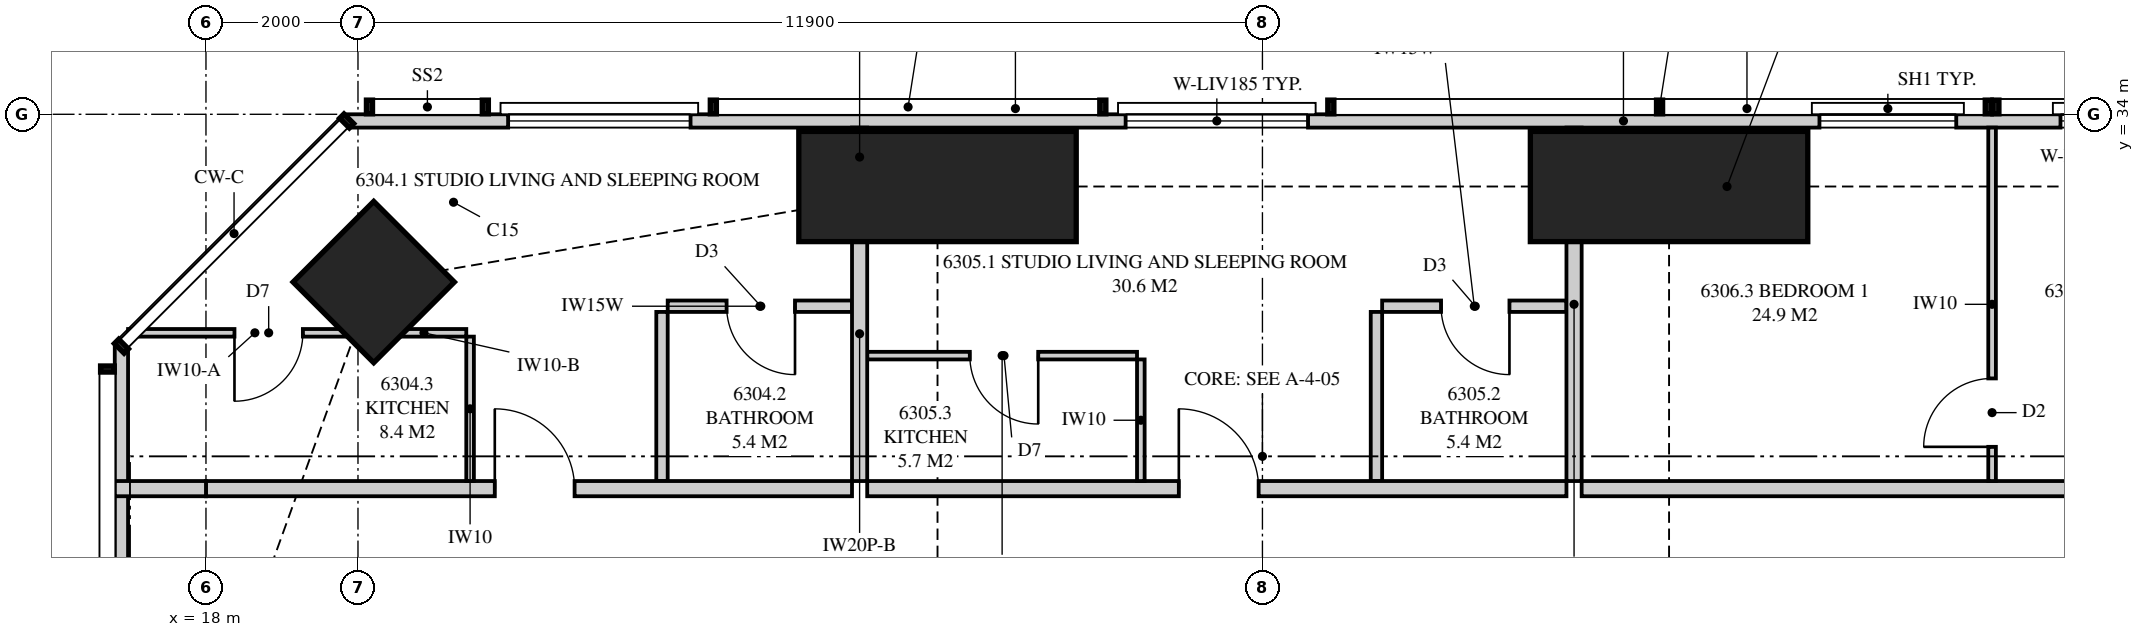
"""IFC4 building model, lengths in metres.
Left out: names, types, materials, properties, quantities, classifications, styles, units other than length and angle.
Written with IfcOpenShell. Run it as: python <this file> out.ifc"""

import sys

from ifc_helpers import new_model, si_unit, direction, frame, frame_2d, origin, origin_2d, place, context, subcontext, project, spatial, polyline, rectangle, outline, extrude, element, fill, save


model = new_model("IFC4")
c1 = context("Model", 3, precision=1e-05, world=origin(), true_north=direction((0.0, 1.0)))
c2 = subcontext(c1, "Body", "Model", "MODEL_VIEW")
j1 = project(units=[si_unit("LENGTHUNIT", "METRE"), si_unit("PLANEANGLEUNIT", "RADIAN")], contexts=[c1])
p1 = place(None, origin())
s1 = spatial("IfcSite", under=j1, at=p1, CompositionType="ELEMENT")
p2 = place(p1, origin())
s2 = spatial("IfcBuilding", under=s1, at=p2, CompositionType="ELEMENT")
p3 = place(p2, frame((0.0, 0.0, 231.95)))
s3 = spatial("IfcBuildingStorey", under=s2, at=p3, CompositionType="ELEMENT", Elevation=231.95)
for number, where, z_axis, x_axis in (
    (1, (37.25, 33.05, 0.0), (0.0, 0.0, 1.0), (0.0, 1.0, 0.0)),
    (2, (27.625, 33.05, 0.0), (0.0, 0.0, 1.0), (0.0, 1.0, 0.0)),
):
    element("IfcColumn", number, at=place(p3, frame(where, z_axis=z_axis, x_axis=x_axis)), inside=s3, PredefinedType="COLUMN", context=c2, shape_type="SweptSolid", body=[
        extrude(rectangle(XDim=1.45, YDim=3.65, at=origin_2d()), origin(), (0.0, 0.0, 1.0), 3.5),
    ])
p4 = place(p3, frame((20.207, 31.793, 0.0), z_axis=(0.0, 0.0, 1.0), x_axis=(0.707106781187, 0.707106781187, 0.0)))
e3 = element("IfcColumn", 3, at=p4, inside=s3, PredefinedType="COLUMN", context=c2, shape_type="SweptSolid", body=[
    extrude(rectangle(XDim=1.5, YDim=1.5, at=origin_2d()), origin(), (0.0, 0.0, 1.0), 3.5),
])
p5 = place(p3, frame((53.449, 33.913, 0.0), z_axis=(0.0, 0.0, 1.0), x_axis=(-1.0, 0.0, 0.0)))
e4 = element("IfcWall", 4, at=p5, inside=s3, PredefinedType="SOLIDWALL", context=c2, shape_type="SweptSolid", body=[
    extrude(outline(polyline([(0.0, 0.0), (33.597, 0.0), (33.597, 3.26), (26.039, 3.26), (26.039, 2.3), (25.955, 2.3), (25.955, 3.26), (25.824, 3.26), (25.824, 2.3), (6.574, 2.3), (6.574, 3.26), (6.442, 3.26), (6.442, 2.3), (6.359, 2.3), (6.359, 3.26), (0.0, 3.26), (0.0, 0.0)])), frame((0.0, 0.087, 0.0), z_axis=(0.0, -1.0, 0.0), x_axis=(1.0, 0.0, 0.0)), (0.0, 0.0, 1.0), 0.175),
])
p6 = place(p5, frame((0.6, 0.0, 0.0)))
e5 = element("IfcOpeningElement", 5, at=p6, cuts=e4, PredefinedType="OPENING", context=c2, shape_type="SweptSolid", body=[
    extrude(rectangle(XDim=1.8, YDim=2.25, at=frame_2d((0.9, 1.125))), frame((0.0, 0.097, 0.0), z_axis=(0.0, -1.0, 0.0), x_axis=(1.0, 0.0, 0.0)), (0.0, 0.0, 1.0), 0.195),
])
p7 = place(p5, frame((2.835, 0.0, 0.4)))
e6 = element("IfcOpeningElement", 6, at=p7, cuts=e4, PredefinedType="OPENING", context=c2, shape_type="SweptSolid", body=[
    extrude(rectangle(XDim=1.8, YDim=1.85, at=frame_2d((0.9, 0.925))), frame((0.0, 0.097, 0.0), z_axis=(0.0, -1.0, 0.0), x_axis=(1.0, 0.0, 0.0)), (0.0, 0.0, 1.0), 0.195),
])
p8 = place(p5, frame((9.249, 0.0, 0.4)))
e7 = element("IfcOpeningElement", 7, at=p8, cuts=e4, PredefinedType="OPENING", context=c2, shape_type="SweptSolid", body=[
    extrude(rectangle(XDim=1.8, YDim=1.85, at=frame_2d((0.9, 0.925))), frame((0.0, 0.097, 0.0), z_axis=(0.0, -1.0, 0.0), x_axis=(1.0, 0.0, 0.0)), (0.0, 0.0, 1.0), 0.195),
])
p9 = place(p5, frame((12.42, 0.0, 0.4)))
e8 = element("IfcOpeningElement", 8, at=p9, cuts=e4, PredefinedType="OPENING", context=c2, shape_type="SweptSolid", body=[
    extrude(rectangle(XDim=1.8, YDim=1.85, at=frame_2d((0.9, 0.925))), frame((0.0, 0.097, 0.0), z_axis=(0.0, -1.0, 0.0), x_axis=(1.0, 0.0, 0.0)), (0.0, 0.0, 1.0), 0.195),
])
p10 = place(p5, frame((20.949, 0.0, 0.4)))
e9 = element("IfcOpeningElement", 9, at=p10, cuts=e4, PredefinedType="OPENING", context=c2, shape_type="SweptSolid", body=[
    extrude(rectangle(XDim=2.4, YDim=1.85, at=frame_2d((1.2, 0.925))), frame((0.0, 0.097, 0.0), z_axis=(0.0, -1.0, 0.0), x_axis=(1.0, 0.0, 0.0)), (0.0, 0.0, 1.0), 0.195),
])
p11 = place(p5, frame((29.073, 0.0, 0.4)))
e10 = element("IfcOpeningElement", 10, at=p11, cuts=e4, PredefinedType="OPENING", context=c2, shape_type="SweptSolid", body=[
    extrude(rectangle(XDim=2.4, YDim=1.85, at=frame_2d((1.2, 0.925))), frame((0.0, 0.097, 0.0), z_axis=(0.0, -1.0, 0.0), x_axis=(1.0, 0.0, 0.0)), (0.0, 0.0, 1.0), 0.195),
])
p12 = place(p3, frame((16.887, 30.949, 0.0), z_axis=(0.0, 0.0, 1.0), x_axis=(0.0, -1.0, 0.0)))
e11 = element("IfcWall", 11, at=p12, inside=s3, PredefinedType="SOLIDWALL", context=c2, shape_type="SweptSolid", body=[
    extrude(outline(polyline([(0.0, 0.0), (27.897, 0.0), (27.897, 3.26), (18.148, 3.26), (18.148, 2.3), (18.125, 2.3), (18.125, 3.26), (17.949, 3.26), (17.949, 2.3), (5.949, 2.3), (5.949, 3.26), (0.0, 3.26), (0.0, 0.0)])), frame((0.0, 0.087, 0.0), z_axis=(0.0, -1.0, 0.0), x_axis=(1.0, 0.0, 0.0)), (0.0, 0.0, 1.0), 0.175),
])
p13 = place(p12, frame((11.849, 0.0, 0.4)))
e12 = element("IfcOpeningElement", 12, at=p13, cuts=e11, PredefinedType="OPENING", context=c2, shape_type="SweptSolid", body=[
    extrude(rectangle(XDim=1.2, YDim=1.85, at=frame_2d((0.6, 0.925))), frame((0.0, 0.097, 0.0), z_axis=(0.0, -1.0, 0.0), x_axis=(1.0, 0.0, 0.0)), (0.0, 0.0, 1.0), 0.195),
])
p14 = place(p3, frame((26.6, 33.825, 0.0), z_axis=(0.0, 0.0, 1.0), x_axis=(0.0, -1.0, 0.0)))
e13 = element("IfcWall", 13, at=p14, inside=s3, PredefinedType="PARTITIONING", context=c2, shape_type="SweptSolid", body=[
    extrude(outline(polyline([(0.026, 2.3), (0.026, 3.26), (0.0, 3.26), (0.0, 0.0), (0.529, 0.0), (0.529, 0.539), (0.775, 0.539), (0.775, 1.761), (0.529, 1.761), (0.529, 2.3), (0.026, 2.3)])), frame((0.0, 0.1, 0.0), z_axis=(0.0, -1.0, 0.0), x_axis=(1.0, 0.0, 0.0)), (0.0, 0.0, 1.0), 0.2),
])
p15 = place(p3, frame((26.6, 33.05, 0.0), z_axis=(0.0, 0.0, 1.0), x_axis=(0.0, -1.0, 0.0)))
e14 = element("IfcWall", 14, at=p15, inside=s3, PredefinedType="PARTITIONING", context=c2, shape_type="SweptSolid", body=[
    extrude(outline(polyline([(0.246, 2.3), (0.246, 1.761), (0.0, 1.761), (0.0, 0.539), (0.246, 0.539), (0.246, 0.0), (3.875, 0.0), (3.875, 2.66), (1.097, 2.66), (1.097, 2.3), (0.246, 2.3)])), frame((0.0, 0.1, 0.0), z_axis=(0.0, -1.0, 0.0), x_axis=(1.0, 0.0, 0.0)), (0.0, 0.0, 1.0), 0.2),
])
p16 = place(p3, frame((18.0, 29.075, 0.0), z_axis=(0.0, 0.0, 1.0), x_axis=(1.0, 0.0, 0.0)))
e15 = element("IfcWall", 15, at=p16, inside=s3, PredefinedType="PARTITIONING", context=c2, shape_type="SweptSolid", body=[
    extrude(outline(polyline([(0.0, 0.0), (8.5, 0.0), (8.5, 3.26), (8.5, 2.66), (8.315, 2.66), (8.315, 3.26), (2.192, 3.26), (2.192, 2.3), (0.256, 2.3), (0.256, 3.26), (0.0, 3.26), (0.0, 0.0)])), frame((0.0, 0.1, 0.0), z_axis=(0.0, -1.0, 0.0), x_axis=(1.0, 0.0, 0.0)), (0.0, 0.0, 1.0), 0.2),
])
p17 = place(p16, frame((3.8, 0.0, 0.0)))
e16 = element("IfcOpeningElement", 16, at=p17, cuts=e15, PredefinedType="OPENING", context=c2, shape_type="SweptSolid", body=[
    extrude(rectangle(XDim=1.05, YDim=2.2, at=frame_2d((0.525, 1.1))), frame((0.0, 0.11, 0.0), z_axis=(0.0, -1.0, 0.0), x_axis=(1.0, 0.0, 0.0)), (0.0, 0.0, 1.0), 0.22),
])
p18 = place(p3, frame((24.075, 31.475, 0.0), z_axis=(0.0, 0.0, 1.0), x_axis=(1.0, 0.0, 0.0)))
e17 = element("IfcWall", 17, at=p18, inside=s3, PredefinedType="PLUMBINGWALL", context=c2, shape_type="SweptSolid", body=[
    extrude(outline(polyline([(0.0, 0.0), (2.425, 0.0), (2.425, 3.26), (2.425, 2.66), (2.265, 2.66), (2.265, 3.26), (0.0, 3.26), (0.0, 0.0)])), frame((0.0, 0.075, 0.0), z_axis=(0.0, -1.0, 0.0), x_axis=(1.0, 0.0, 0.0)), (0.0, 0.0, 1.0), 0.15),
])
p19 = place(p18, frame((0.775, 0.0, 0.0)))
e18 = element("IfcOpeningElement", 18, at=p19, cuts=e17, PredefinedType="OPENING", context=c2, shape_type="SweptSolid", body=[
    extrude(rectangle(XDim=0.9, YDim=2.1, at=frame_2d((0.45, 1.05))), frame((0.0, 0.085, 0.0), z_axis=(0.0, -1.0, 0.0), x_axis=(1.0, 0.0, 0.0)), (0.0, 0.0, 1.0), 0.17),
])
p20 = place(p3, frame((24.0, 31.4, 0.0), z_axis=(0.0, 0.0, 1.0), x_axis=(0.0, -1.0, 0.0)))
e19 = element("IfcWall", 19, at=p20, inside=s3, PredefinedType="PLUMBINGWALL", context=c2, shape_type="SweptSolid", body=[
    extrude(rectangle(XDim=2.225, YDim=0.15, at=frame_2d((1.112, 0.0))), origin(), (0.0, 0.0, 1.0), 3.26),
])
p21 = place(p3, frame((16.975, 31.125, 0.0), z_axis=(0.0, 0.0, 1.0), x_axis=(1.0, 0.0, 0.0)))
e20 = element("IfcWall", 20, at=p21, inside=s3, PredefinedType="PARTITIONING", context=c2, shape_type="SweptSolid", body=[
    extrude(outline(polyline([(0.0, 0.0), (3.337, 0.0), (3.337, 2.3), (2.076, 2.3), (2.076, 3.26), (0.0, 3.26), (0.0, 0.0)])), frame((0.0, 0.05, 0.0), z_axis=(0.0, -1.0, 0.0), x_axis=(1.0, 0.0, 0.0)), (0.0, 0.0, 1.0), 0.1),
])
p22 = place(p21, frame((1.4, 0.0, 0.0)))
e21 = element("IfcOpeningElement", 21, at=p22, cuts=e20, PredefinedType="OPENING", context=c2, shape_type="SweptSolid", body=[
    extrude(rectangle(XDim=0.9, YDim=2.1, at=frame_2d((0.45, 1.05))), frame((0.0, 0.06, 0.0), z_axis=(0.0, -1.0, 0.0), x_axis=(1.0, 0.0, 0.0)), (0.0, 0.0, 1.0), 0.12),
])
p23 = place(p3, frame((20.312, 31.125, 0.0), z_axis=(0.0, 0.0, 1.0), x_axis=(1.0, 0.0, 0.0)))
e22 = element("IfcWall", 22, at=p23, inside=s3, PredefinedType="PARTITIONING", context=c2, shape_type="SweptSolid", body=[
    extrude(rectangle(XDim=1.113, YDim=0.1, at=frame_2d((0.557, 0.0))), origin(), (0.0, 0.0, 1.0), 2.3),
])
p24 = place(p3, frame((21.475, 31.075, 0.0), z_axis=(0.0, 0.0, 1.0), x_axis=(0.0, -1.0, 0.0)))
e23 = element("IfcWall", 23, at=p24, inside=s3, PredefinedType="PARTITIONING", context=c2, shape_type="SweptSolid", body=[
    extrude(rectangle(XDim=1.9, YDim=0.1, at=frame_2d((0.95, 0.0))), origin(), (0.0, 0.0, 1.0), 3.26),
])
p25 = place(p3, frame((36.0, 33.825, 0.0), z_axis=(0.0, 0.0, 1.0), x_axis=(0.0, -1.0, 0.0)))
e24 = element("IfcWall", 24, at=p25, inside=s3, PredefinedType="PARTITIONING", context=c2, shape_type="SweptSolid", body=[
    extrude(outline(polyline([(0.529, 2.3), (0.0, 2.3), (0.0, 0.0), (0.529, 0.0), (0.529, 0.281), (1.021, 0.281), (1.021, 0.0), (4.65, 0.0), (4.65, 2.66), (1.685, 2.66), (1.685, 2.3), (1.021, 2.3), (1.021, 2.019), (0.529, 2.019), (0.529, 2.3)])), frame((0.0, 0.1, 0.0), z_axis=(0.0, -1.0, 0.0), x_axis=(1.0, 0.0, 0.0)), (0.0, 0.0, 1.0), 0.2),
])
p26 = place(p3, frame((26.7, 29.075, 0.0), z_axis=(0.0, 0.0, 1.0), x_axis=(1.0, 0.0, 0.0)))
e25 = element("IfcWall", 25, at=p26, inside=s3, PredefinedType="PARTITIONING", context=c2, shape_type="SweptSolid", body=[
    extrude(outline(polyline([(0.0, 0.0), (9.2, 0.0), (9.2, 3.26), (2.235, 3.26), (2.235, 2.66), (0.0, 2.66), (0.0, 3.26), (0.0, 0.0)])), frame((0.0, 0.1, 0.0), z_axis=(0.0, -1.0, 0.0), x_axis=(1.0, 0.0, 0.0)), (0.0, 0.0, 1.0), 0.2),
])
p27 = place(p26, frame((4.1, 0.0, 0.0)))
e26 = element("IfcOpeningElement", 26, at=p27, cuts=e25, PredefinedType="OPENING", context=c2, shape_type="SweptSolid", body=[
    extrude(rectangle(XDim=1.05, YDim=2.2, at=frame_2d((0.525, 1.1))), frame((0.0, 0.11, 0.0), z_axis=(0.0, -1.0, 0.0), x_axis=(1.0, 0.0, 0.0)), (0.0, 0.0, 1.0), 0.22),
])
p28 = place(p3, frame((33.475, 31.475, 0.0), z_axis=(0.0, 0.0, 1.0), x_axis=(1.0, 0.0, 0.0)))
e27 = element("IfcWall", 27, at=p28, inside=s3, PredefinedType="PLUMBINGWALL", context=c2, shape_type="SweptSolid", body=[
    extrude(rectangle(XDim=2.425, YDim=0.15, at=frame_2d((1.212, 0.0))), origin(), (0.0, 0.0, 1.0), 3.26),
])
p29 = place(p28, frame((0.775, 0.0, 0.0)))
e28 = element("IfcOpeningElement", 28, at=p29, cuts=e27, PredefinedType="OPENING", context=c2, shape_type="SweptSolid", body=[
    extrude(rectangle(XDim=0.9, YDim=2.1, at=frame_2d((0.45, 1.05))), frame((0.0, 0.085, 0.0), z_axis=(0.0, -1.0, 0.0), x_axis=(1.0, 0.0, 0.0)), (0.0, 0.0, 1.0), 0.17),
])
p30 = place(p3, frame((33.4, 31.4, 0.0), z_axis=(0.0, 0.0, 1.0), x_axis=(0.0, -1.0, 0.0)))
e29 = element("IfcWall", 29, at=p30, inside=s3, PredefinedType="PLUMBINGWALL", context=c2, shape_type="SweptSolid", body=[
    extrude(rectangle(XDim=2.225, YDim=0.15, at=frame_2d((1.112, 0.0))), origin(), (0.0, 0.0, 1.0), 3.26),
])
p31 = place(p3, frame((26.7, 30.825, 0.0), z_axis=(0.0, 0.0, 1.0), x_axis=(1.0, 0.0, 0.0)))
e30 = element("IfcWall", 30, at=p31, inside=s3, PredefinedType="PARTITIONING", context=c2, shape_type="SweptSolid", body=[
    extrude(outline(polyline([(0.0, 0.0), (3.55, 0.0), (3.55, 3.26), (2.185, 3.26), (2.185, 2.66), (0.0, 2.66), (0.0, 3.26), (0.0, 0.0)])), frame((0.0, 0.05, 0.0), z_axis=(0.0, -1.0, 0.0), x_axis=(1.0, 0.0, 0.0)), (0.0, 0.0, 1.0), 0.1),
])
p32 = place(p31, frame((1.35, 0.0, 0.0)))
e31 = element("IfcOpeningElement", 31, at=p32, cuts=e30, PredefinedType="OPENING", context=c2, shape_type="SweptSolid", body=[
    extrude(rectangle(XDim=0.9, YDim=2.1, at=frame_2d((0.45, 1.05))), frame((0.0, 0.06, 0.0), z_axis=(0.0, -1.0, 0.0), x_axis=(1.0, 0.0, 0.0)), (0.0, 0.0, 1.0), 0.12),
])
p33 = place(p3, frame((30.3, 30.775, 0.0), z_axis=(0.0, 0.0, 1.0), x_axis=(0.0, -1.0, 0.0)))
e32 = element("IfcWall", 32, at=p33, inside=s3, PredefinedType="PARTITIONING", context=c2, shape_type="SweptSolid", body=[
    extrude(rectangle(XDim=1.6, YDim=0.1, at=frame_2d((0.8, 0.0))), origin(), (0.0, 0.0, 1.0), 3.26),
])
p34 = place(p3, frame((36.1, 29.075, 0.0), z_axis=(0.0, 0.0, 1.0), x_axis=(1.0, 0.0, 0.0)))
e33 = element("IfcWall", 33, at=p34, inside=s3, PredefinedType="PARTITIONING", context=c2, shape_type="SweptSolid", body=[
    extrude(outline(polyline([(0.0, 0.0), (20.225, 0.0), (20.225, 3.26), (19.621, 3.26), (19.621, 2.3), (17.771, 2.3), (17.771, 3.26), (12.085, 3.26), (12.085, 2.66), (9.465, 2.66), (9.465, 3.26), (2.46, 3.26), (2.46, 2.66), (0.0, 2.66), (0.0, 3.26), (0.0, 0.0)])), frame((0.0, 0.1, 0.0), z_axis=(0.0, -1.0, 0.0), x_axis=(1.0, 0.0, 0.0)), (0.0, 0.0, 1.0), 0.2),
])
p35 = place(p34, frame((9.65, 0.0, 0.0)))
e34 = element("IfcOpeningElement", 34, at=p35, cuts=e33, PredefinedType="OPENING", context=c2, shape_type="SweptSolid", body=[
    extrude(rectangle(XDim=1.05, YDim=2.2, at=frame_2d((0.525, 1.1))), frame((0.0, 0.11, 0.0), z_axis=(0.0, -1.0, 0.0), x_axis=(1.0, 0.0, 0.0)), (0.0, 0.0, 1.0), 0.22),
])
p36 = place(p3, frame((41.5, 33.825, 0.0), z_axis=(0.0, 0.0, 1.0), x_axis=(0.0, -1.0, 0.0)))
e35 = element("IfcWall", 35, at=p36, inside=s3, PredefinedType="PARTITIONING", context=c2, shape_type="SweptSolid", body=[
    extrude(outline(polyline([(0.0, 0.0), (4.65, 0.0), (4.65, 3.26), (1.635, 3.26), (1.635, 2.3), (0.0, 2.3), (0.0, 3.26), (0.0, 0.0)])), frame((0.0, 0.05, 0.0), z_axis=(0.0, -1.0, 0.0), x_axis=(1.0, 0.0, 0.0)), (0.0, 0.0, 1.0), 0.1),
])
p37 = place(p36, frame((3.3, 0.0, 0.0)))
e36 = element("IfcOpeningElement", 36, at=p37, cuts=e35, PredefinedType="OPENING", context=c2, shape_type="SweptSolid", body=[
    extrude(rectangle(XDim=0.9, YDim=2.1, at=frame_2d((0.45, 1.05))), frame((0.0, 0.06, 0.0), z_axis=(0.0, -1.0, 0.0), x_axis=(1.0, 0.0, 0.0)), (0.0, 0.0, 1.0), 0.12),
])
p38 = place(p3, frame((16.8, 29.075, 0.0), z_axis=(0.0, 0.0, 1.0), x_axis=(1.0, 0.0, 0.0)))
e37 = element("IfcWall", 37, at=p38, inside=s3, PredefinedType="PARTITIONING", context=c2, shape_type="SweptSolid", body=[
    extrude(rectangle(XDim=1.2, YDim=0.2, at=frame_2d((0.6, 0.0))), origin(), (0.0, 0.0, 1.0), 3.26),
])
p39 = place(p8, origin())
e38 = element("IfcWindow", 38, at=p39, inside=s3, PartitioningType="SINGLE_PANEL", PredefinedType="WINDOW", context=c2, shape_type="SweptSolid", body=[
    extrude(rectangle(XDim=1.8, YDim=1.85, at=frame_2d((0.9, 0.925))), frame((0.0, 0.03, 0.0), z_axis=(0.0, -1.0, 0.0), x_axis=(1.0, 0.0, 0.0)), (0.0, 0.0, 1.0), 0.06),
])
fill(e7, e38)
p40 = place(p9, origin())
e39 = element("IfcWindow", 39, at=p40, inside=s3, PartitioningType="SINGLE_PANEL", PredefinedType="WINDOW", context=c2, shape_type="SweptSolid", body=[
    extrude(rectangle(XDim=1.8, YDim=1.85, at=frame_2d((0.9, 0.925))), frame((0.0, 0.03, 0.0), z_axis=(0.0, -1.0, 0.0), x_axis=(1.0, 0.0, 0.0)), (0.0, 0.0, 1.0), 0.06),
])
fill(e8, e39)
p41 = place(p10, origin())
e40 = element("IfcWindow", 40, at=p41, inside=s3, PartitioningType="SINGLE_PANEL", PredefinedType="WINDOW", context=c2, shape_type="SweptSolid", body=[
    extrude(rectangle(XDim=2.4, YDim=1.85, at=frame_2d((1.2, 0.925))), frame((0.0, 0.03, 0.0), z_axis=(0.0, -1.0, 0.0), x_axis=(1.0, 0.0, 0.0)), (0.0, 0.0, 1.0), 0.06),
])
fill(e9, e40)
p42 = place(p11, origin())
e41 = element("IfcWindow", 41, at=p42, inside=s3, PartitioningType="SINGLE_PANEL", PredefinedType="WINDOW", context=c2, shape_type="SweptSolid", body=[
    extrude(rectangle(XDim=2.4, YDim=1.85, at=frame_2d((1.2, 0.925))), frame((0.0, 0.03, 0.0), z_axis=(0.0, -1.0, 0.0), x_axis=(1.0, 0.0, 0.0)), (0.0, 0.0, 1.0), 0.06),
])
fill(e10, e41)
p43 = place(p17, origin())
e42 = element("IfcDoor", 42, at=p43, inside=s3, OperationType="SINGLE_SWING_LEFT", PredefinedType="DOOR", context=c2, shape_type="SweptSolid", body=[
    extrude(rectangle(XDim=1.05, YDim=2.2, at=frame_2d((0.525, 1.1))), frame((0.0, 0.025, 0.0), z_axis=(0.0, -1.0, 0.0), x_axis=(1.0, 0.0, 0.0)), (0.0, 0.0, 1.0), 0.05),
])
fill(e16, e42)
p44 = place(p19, frame((0.9, 0.0, 0.0), z_axis=(0.0, 0.0, 1.0), x_axis=(-1.0, 0.0, 0.0)))
e43 = element("IfcDoor", 43, at=p44, inside=s3, OperationType="SINGLE_SWING_LEFT", PredefinedType="DOOR", context=c2, shape_type="SweptSolid", body=[
    extrude(rectangle(XDim=0.9, YDim=2.1, at=frame_2d((0.45, 1.05))), frame((0.0, 0.025, 0.0), z_axis=(0.0, -1.0, 0.0), x_axis=(1.0, 0.0, 0.0)), (0.0, 0.0, 1.0), 0.05),
])
fill(e18, e43)
p45 = place(p22, frame((0.9, 0.0, 0.0), z_axis=(0.0, 0.0, 1.0), x_axis=(-1.0, 0.0, 0.0)))
e44 = element("IfcDoor", 44, at=p45, inside=s3, OperationType="SINGLE_SWING_RIGHT", PredefinedType="DOOR", context=c2, shape_type="SweptSolid", body=[
    extrude(rectangle(XDim=0.9, YDim=2.1, at=frame_2d((0.45, 1.05))), frame((0.0, 0.025, 0.0), z_axis=(0.0, -1.0, 0.0), x_axis=(1.0, 0.0, 0.0)), (0.0, 0.0, 1.0), 0.05),
])
fill(e21, e44)
p46 = place(p27, origin())
e45 = element("IfcDoor", 45, at=p46, inside=s3, OperationType="SINGLE_SWING_LEFT", PredefinedType="DOOR", context=c2, shape_type="SweptSolid", body=[
    extrude(rectangle(XDim=1.05, YDim=2.2, at=frame_2d((0.525, 1.1))), frame((0.0, 0.025, 0.0), z_axis=(0.0, -1.0, 0.0), x_axis=(1.0, 0.0, 0.0)), (0.0, 0.0, 1.0), 0.05),
])
fill(e26, e45)
p47 = place(p29, frame((0.9, 0.0, 0.0), z_axis=(0.0, 0.0, 1.0), x_axis=(-1.0, 0.0, 0.0)))
e46 = element("IfcDoor", 46, at=p47, inside=s3, OperationType="SINGLE_SWING_LEFT", PredefinedType="DOOR", context=c2, shape_type="SweptSolid", body=[
    extrude(rectangle(XDim=0.9, YDim=2.1, at=frame_2d((0.45, 1.05))), frame((0.0, 0.025, 0.0), z_axis=(0.0, -1.0, 0.0), x_axis=(1.0, 0.0, 0.0)), (0.0, 0.0, 1.0), 0.05),
])
fill(e28, e46)
p48 = place(p32, frame((0.9, 0.0, 0.0), z_axis=(0.0, 0.0, 1.0), x_axis=(-1.0, 0.0, 0.0)))
e47 = element("IfcDoor", 47, at=p48, inside=s3, OperationType="SINGLE_SWING_LEFT", PredefinedType="DOOR", context=c2, shape_type="SweptSolid", body=[
    extrude(rectangle(XDim=0.9, YDim=2.1, at=frame_2d((0.45, 1.05))), frame((0.0, 0.025, 0.0), z_axis=(0.0, -1.0, 0.0), x_axis=(1.0, 0.0, 0.0)), (0.0, 0.0, 1.0), 0.05),
])
fill(e31, e47)
p49 = place(p37, frame((0.9, 0.0, 0.0), z_axis=(0.0, 0.0, 1.0), x_axis=(-1.0, 0.0, 0.0)))
e48 = element("IfcDoor", 48, at=p49, inside=s3, OperationType="SINGLE_SWING_LEFT", PredefinedType="DOOR", context=c2, shape_type="SweptSolid", body=[
    extrude(rectangle(XDim=0.9, YDim=2.1, at=frame_2d((0.45, 1.05))), frame((0.0, 0.025, 0.0), z_axis=(0.0, -1.0, 0.0), x_axis=(1.0, 0.0, 0.0)), (0.0, 0.0, 1.0), 0.05),
])
fill(e36, e48)
save(model, sys.argv[1])
